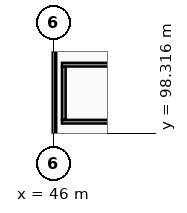
"""IFC4 building model, lengths in metres.
Left out: names, types, materials, properties, quantities, classifications, styles, units other than length and angle.
Written with IfcOpenShell. Run it as: python <this file> out.ifc"""

import sys

from ifc_helpers import new_model, si_unit, direction, frame, frame_2d, origin, place, context, subcontext, project, spatial, rectangle, extrude, element, fill, save


model = new_model("IFC4")
c1 = context("Model", 3, precision=1e-05, world=origin(), true_north=direction((0.0, 1.0)))
c2 = subcontext(c1, "Body", "Model", "MODEL_VIEW")
j1 = project(units=[si_unit("LENGTHUNIT", "METRE"), si_unit("PLANEANGLEUNIT", "RADIAN")], contexts=[c1])
p1 = place(None, origin())
s1 = spatial("IfcSite", under=j1, at=p1, CompositionType="ELEMENT")
p2 = place(p1, origin())
s2 = spatial("IfcBuilding", under=s1, at=p2, CompositionType="ELEMENT")
p3 = place(p2, frame((0.0, 0.0, 21.6)))
s3 = spatial("IfcBuildingStorey", under=s2, at=p3, CompositionType="ELEMENT", Elevation=21.6)
p4 = place(p3, frame((46.0, 106.0, 0.0), z_axis=(0.0, 0.0, 1.0), x_axis=(0.0, -1.0, 0.0)))
e1 = element("IfcWall", 1, at=p4, inside=s3, PredefinedType="SOLIDWALL", context=c2, shape_type="SweptSolid", body=[
    extrude(rectangle(XDim=8.4, YDim=0.36, at=frame_2d((4.2, 0.0))), origin(), (0.0, 0.0, 1.0), 2.71),
])
p5 = place(p4, frame((0.46, 0.0, 0.75)))
e2 = element("IfcOpeningElement", 2, at=p5, cuts=e1, PredefinedType="OPENING", context=c2, shape_type="SweptSolid", body=[
    extrude(rectangle(XDim=1.55, YDim=1.82, at=frame_2d((0.775, 0.91))), frame((0.0, 0.19, 0.0), z_axis=(0.0, -1.0, 0.0), x_axis=(1.0, 0.0, 0.0)), (0.0, 0.0, 1.0), 0.38),
])
p6 = place(p4, frame((6.26, 0.0, 0.75)))
e3 = element("IfcOpeningElement", 3, at=p6, cuts=e1, PredefinedType="OPENING", context=c2, shape_type="SweptSolid", body=[
    extrude(rectangle(XDim=1.55, YDim=1.82, at=frame_2d((0.775, 0.91))), frame((0.0, 0.19, 0.0), z_axis=(0.0, -1.0, 0.0), x_axis=(1.0, 0.0, 0.0)), (0.0, 0.0, 1.0), 0.38),
])
p7 = place(p3, frame((46.0, 97.6, 3.6), z_axis=(0.0, 0.0, 1.0), x_axis=(0.0, 1.0, 0.0)))
e4 = element("IfcWall", 4, at=p7, inside=s3, PredefinedType="PARAPET", context=c2, shape_type="SweptSolid", body=[
    extrude(rectangle(XDim=17.4, YDim=0.22, at=frame_2d((8.7, 0.0))), origin(), (0.0, 0.0, 1.0), 1.15),
])
p8 = place(p3, frame((46.675, 102.7, 0.0), z_axis=(0.0, 0.0, 1.0), x_axis=(0.0, -1.0, 0.0)))
e5 = element("IfcWall", 5, at=p8, inside=s3, PredefinedType="SHEAR", context=c2, shape_type="SweptSolid", body=[
    extrude(rectangle(XDim=3.5, YDim=0.25, at=frame_2d((1.75, 0.0))), origin(), (0.0, 0.0, 1.0), 3.6),
])
p9 = place(p8, frame((1.1, 0.0, -0.01)))
e6 = element("IfcOpeningElement", 6, at=p9, cuts=e5, PredefinedType="OPENING", context=c2, shape_type="SweptSolid", body=[
    extrude(rectangle(XDim=1.3, YDim=2.16, at=frame_2d((0.65, 1.08))), frame((0.0, 0.135, 0.0), z_axis=(0.0, -1.0, 0.0), x_axis=(1.0, 0.0, 0.0)), (0.0, 0.0, 1.0), 0.27),
])
for number, where, z_axis, x_axis in (
    (7, (46.55, 99.075, 0.0), (0.0, 0.0, 1.0), (1.0, 0.0, 0.0)),
    (8, (46.55, 102.825, 0.0), (0.0, 0.0, 1.0), (1.0, 0.0, 0.0)),
):
    element("IfcWall", number, at=place(p3, frame(where, z_axis=z_axis, x_axis=x_axis)), inside=s3, PredefinedType="SHEAR", context=c2, shape_type="SweptSolid", body=[
        extrude(rectangle(XDim=8.9, YDim=0.25, at=frame_2d((4.45, 0.0))), origin(), (0.0, 0.0, 1.0), 3.6),
    ])
p10 = place(p6, origin())
e9 = element("IfcWindow", 9, at=p10, inside=s3, PartitioningType="DOUBLE_PANEL_HORIZONTAL", PredefinedType="WINDOW", context=c2, shape_type="SweptSolid", body=[
    extrude(rectangle(XDim=1.55, YDim=1.82, at=frame_2d((0.775, 0.91))), frame((0.0, 0.03, 0.0), z_axis=(0.0, -1.0, 0.0), x_axis=(1.0, 0.0, 0.0)), (0.0, 0.0, 1.0), 0.06),
])
fill(e3, e9)
p11 = place(p9, frame((0.0, 0.0, 0.01)))
e10 = element("IfcDoor", 10, at=p11, inside=s3, OperationType="SINGLE_SWING_RIGHT", PredefinedType="DOOR", context=c2, shape_type="SweptSolid", body=[
    extrude(rectangle(XDim=1.3, YDim=2.15, at=frame_2d((0.65, 1.075))), frame((0.0, 0.025, 0.0), z_axis=(0.0, -1.0, 0.0), x_axis=(1.0, 0.0, 0.0)), (0.0, 0.0, 1.0), 0.05),
])
fill(e6, e10)
save(model, sys.argv[1])
